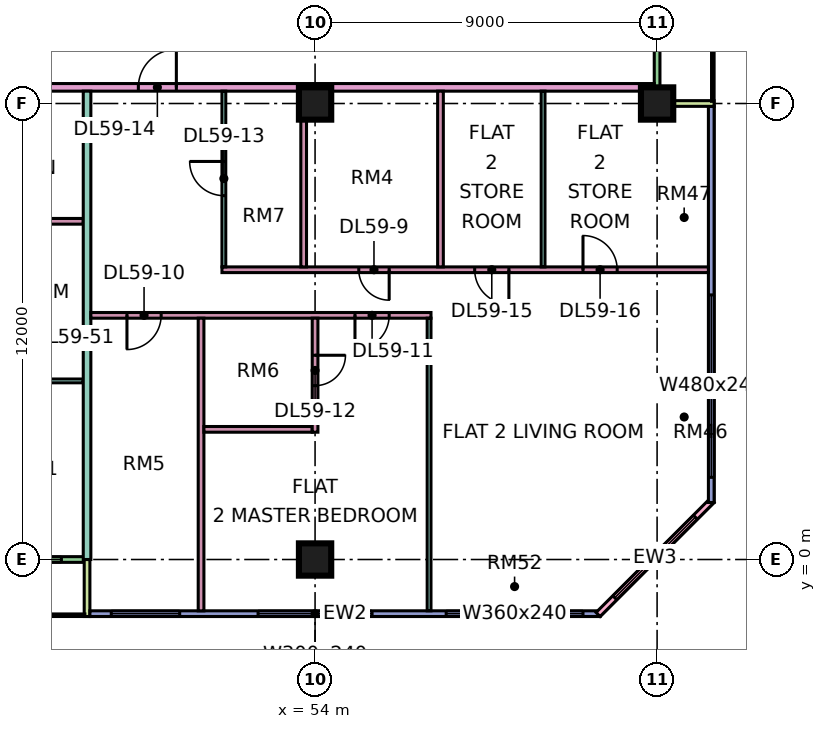
"""IFC4 building model, lengths in metres.
Left out: names, types, materials, properties, quantities, classifications, styles, units other than length and angle.
Written with IfcOpenShell. Run it as: python <this file> out.ifc"""

import sys

from ifc_helpers import new_model, si_unit, direction, frame, frame_2d, origin, origin_2d, place, context, subcontext, project, spatial, rectangle, extrude, element, fill, save


model = new_model("IFC4")
c1 = context("Model", 3, precision=1e-05, world=origin(), true_north=direction((0.0, 1.0)))
c2 = subcontext(c1, "Body", "Model", "MODEL_VIEW")
j1 = project(units=[si_unit("LENGTHUNIT", "METRE"), si_unit("PLANEANGLEUNIT", "RADIAN")], contexts=[c1])
p1 = place(None, origin())
s1 = spatial("IfcSite", under=j1, at=p1, CompositionType="ELEMENT")
p2 = place(p1, origin())
s2 = spatial("IfcBuilding", under=s1, at=p2, CompositionType="ELEMENT")
p3 = place(p2, frame((0.0, 0.0, 249.15)))
s3 = spatial("IfcBuildingStorey", under=s2, at=p3, CompositionType="ELEMENT", Elevation=249.15)
for number, where, z_axis, x_axis in (
    (1, (54.0, 0.0, 0.0), (0.0, 0.0, 1.0), (1.0, 0.0, 0.0)),
    (2, (54.0, 12.0, 0.0), (0.0, 0.0, 1.0), (1.0, 0.0, 0.0)),
    (3, (63.0, 12.0, 0.0), (0.0, 0.0, 1.0), (1.0, 0.0, 0.0)),
):
    element("IfcColumn", number, at=place(p3, frame(where, z_axis=z_axis, x_axis=x_axis)), inside=s3, PredefinedType="COLUMN", context=c2, shape_type="SweptSolid", body=[
        extrude(rectangle(XDim=0.85, YDim=0.85, at=origin_2d()), origin(), (0.0, 0.0, 1.0), 3.75),
    ])
p4 = place(p3, frame((36.075, 0.0, 0.0), z_axis=(0.0, 0.0, 1.0), x_axis=(1.0, 0.0, 0.0)))
e4 = element("IfcWall", 4, at=p4, inside=s3, PredefinedType="SOLIDWALL", context=c2, shape_type="SweptSolid", body=[
    extrude(rectangle(XDim=11.85, YDim=0.15, at=frame_2d((5.925, 0.0))), origin(), (0.0, 0.0, 1.0), 3.35),
])
p5 = place(p4, frame((2.288, 0.0, 0.0)))
e5 = element("IfcOpeningElement", 5, at=p5, cuts=e4, PredefinedType="OPENING", context=c2, shape_type="SweptSolid", body=[
    extrude(rectangle(XDim=1.8, YDim=2.4, at=frame_2d((0.9, 1.2))), frame((0.0, 0.085, 0.0), z_axis=(0.0, -1.0, 0.0), x_axis=(1.0, 0.0, 0.0)), (0.0, 0.0, 1.0), 0.17),
])
p6 = place(p4, frame((6.562, 0.0, 0.45)))
e6 = element("IfcOpeningElement", 6, at=p6, cuts=e4, PredefinedType="OPENING", context=c2, shape_type="SweptSolid", body=[
    extrude(rectangle(XDim=1.2, YDim=2.4, at=frame_2d((0.6, 1.2))), frame((0.0, 0.085, 0.0), z_axis=(0.0, -1.0, 0.0), x_axis=(1.0, 0.0, 0.0)), (0.0, 0.0, 1.0), 0.17),
])
p7 = place(p4, frame((10.05, 0.0, 0.45)))
e7 = element("IfcOpeningElement", 7, at=p7, cuts=e4, PredefinedType="OPENING", context=c2, shape_type="SweptSolid", body=[
    extrude(rectangle(XDim=1.2, YDim=2.4, at=frame_2d((0.6, 1.2))), frame((0.0, 0.085, 0.0), z_axis=(0.0, -1.0, 0.0), x_axis=(1.0, 0.0, 0.0)), (0.0, 0.0, 1.0), 0.17),
])
p8 = place(p3, frame((48.0, -1.5, 0.0), z_axis=(0.0, 0.0, 1.0), x_axis=(0.0, 1.0, 0.0)))
e8 = element("IfcWall", 8, at=p8, inside=s3, PredefinedType="SOLIDWALL", context=c2, shape_type="SweptSolid", body=[
    extrude(rectangle(XDim=1.5, YDim=0.15, at=frame_2d((0.75, 0.0))), origin(), (0.0, 0.0, 1.0), 3.35),
])
p9 = place(p3, frame((48.075, -1.425, 0.0), z_axis=(0.0, 0.0, 1.0), x_axis=(1.0, 0.0, 0.0)))
e9 = element("IfcWall", 9, at=p9, inside=s3, PredefinedType="SOLIDWALL", context=c2, shape_type="SweptSolid", body=[
    extrude(rectangle(XDim=13.425, YDim=0.15, at=frame_2d((6.712, 0.0))), origin(), (0.0, 0.0, 1.0), 3.35),
])
p10 = place(p9, frame((0.562, 0.0, 0.45)))
e10 = element("IfcOpeningElement", 10, at=p10, cuts=e9, PredefinedType="OPENING", context=c2, shape_type="SweptSolid", body=[
    extrude(rectangle(XDim=1.8, YDim=2.4, at=frame_2d((0.9, 1.2))), frame((0.0, 0.085, 0.0), z_axis=(0.0, -1.0, 0.0), x_axis=(1.0, 0.0, 0.0)), (0.0, 0.0, 1.0), 0.17),
])
p11 = place(p9, frame((4.425, 0.0, 0.45)))
e11 = element("IfcOpeningElement", 11, at=p11, cuts=e9, PredefinedType="OPENING", context=c2, shape_type="SweptSolid", body=[
    extrude(rectangle(XDim=3.0, YDim=2.4, at=frame_2d((1.5, 1.2))), frame((0.0, 0.085, 0.0), z_axis=(0.0, -1.0, 0.0), x_axis=(1.0, 0.0, 0.0)), (0.0, 0.0, 1.0), 0.17),
])
p12 = place(p9, frame((9.375, 0.0, 0.45)))
e12 = element("IfcOpeningElement", 12, at=p12, cuts=e9, PredefinedType="OPENING", context=c2, shape_type="SweptSolid", body=[
    extrude(rectangle(XDim=3.6, YDim=2.4, at=frame_2d((1.8, 1.2))), frame((0.0, 0.085, 0.0), z_axis=(0.0, -1.0, 0.0), x_axis=(1.0, 0.0, 0.0)), (0.0, 0.0, 1.0), 0.17),
])
p13 = place(p3, frame((61.447, -1.447, 0.0), z_axis=(0.0, 0.0, 1.0), x_axis=(0.707106781187, 0.707106781187, 0.0)))
e13 = element("IfcWall", 13, at=p13, inside=s3, PredefinedType="SOLIDWALL", context=c2, shape_type="SweptSolid", body=[
    extrude(rectangle(XDim=4.243, YDim=0.15, at=frame_2d((2.121, 0.0))), origin(), (0.0, 0.0, 1.0), 3.35),
])
p14 = place(p13, frame((0.621, 0.0, 0.45)))
e14 = element("IfcOpeningElement", 14, at=p14, cuts=e13, PredefinedType="OPENING", context=c2, shape_type="SweptSolid", body=[
    extrude(rectangle(XDim=3.0, YDim=2.4, at=frame_2d((1.5, 1.2))), frame((0.0, 0.085, 0.0), z_axis=(0.0, -1.0, 0.0), x_axis=(1.0, 0.0, 0.0)), (0.0, 0.0, 1.0), 0.17),
])
p15 = place(p3, frame((64.425, 1.5, 0.0), z_axis=(0.0, 0.0, 1.0), x_axis=(0.0, 1.0, 0.0)))
e15 = element("IfcWall", 15, at=p15, inside=s3, PredefinedType="SOLIDWALL", context=c2, shape_type="SweptSolid", body=[
    extrude(rectangle(XDim=10.425, YDim=0.15, at=frame_2d((5.212, 0.0))), origin(), (0.0, 0.0, 1.0), 3.35),
])
p16 = place(p15, frame((0.663, 0.0, 0.45)))
e16 = element("IfcOpeningElement", 16, at=p16, cuts=e15, PredefinedType="OPENING", context=c2, shape_type="SweptSolid", body=[
    extrude(rectangle(XDim=4.8, YDim=2.4, at=frame_2d((2.4, 1.2))), frame((0.0, 0.085, 0.0), z_axis=(0.0, -1.0, 0.0), x_axis=(1.0, 0.0, 0.0)), (0.0, 0.0, 1.0), 0.17),
])
p17 = place(p3, frame((63.0, 12.075, 0.0), z_axis=(0.0, 0.0, 1.0), x_axis=(0.0, 1.0, 0.0)))
e17 = element("IfcWall", 17, at=p17, inside=s3, PredefinedType="SOLIDWALL", context=c2, shape_type="SweptSolid", body=[
    extrude(rectangle(XDim=10.35, YDim=0.15, at=frame_2d((5.175, 0.0))), origin(), (0.0, 0.0, 1.0), 3.35),
])
p18 = place(p17, frame((4.875, 0.0, 0.0)))
e18 = element("IfcOpeningElement", 18, at=p18, cuts=e17, PredefinedType="OPENING", context=c2, shape_type="SweptSolid", body=[
    extrude(rectangle(XDim=1.8, YDim=2.4, at=frame_2d((0.9, 1.2))), frame((0.0, 0.085, 0.0), z_axis=(0.0, -1.0, 0.0), x_axis=(1.0, 0.0, 0.0)), (0.0, 0.0, 1.0), 0.17),
])
p19 = place(p17, frame((8.587, 0.0, 0.45)))
e19 = element("IfcOpeningElement", 19, at=p19, cuts=e17, PredefinedType="OPENING", context=c2, shape_type="SweptSolid", body=[
    extrude(rectangle(XDim=1.2, YDim=2.4, at=frame_2d((0.6, 1.2))), frame((0.0, 0.085, 0.0), z_axis=(0.0, -1.0, 0.0), x_axis=(1.0, 0.0, 0.0)), (0.0, 0.0, 1.0), 0.17),
])
p20 = place(p3, frame((64.5, 12.0, 0.0), z_axis=(0.0, 0.0, 1.0), x_axis=(-1.0, 0.0, 0.0)))
e20 = element("IfcWall", 20, at=p20, inside=s3, PredefinedType="SOLIDWALL", context=c2, shape_type="SweptSolid", body=[
    extrude(rectangle(XDim=1.5, YDim=0.15, at=frame_2d((0.75, 0.0))), origin(), (0.0, 0.0, 1.0), 3.35),
])
p21 = place(p3, frame((33.05, 4.7, 0.0), z_axis=(0.0, 0.0, 1.0), x_axis=(1.0, 0.0, 0.0)))
e21 = element("IfcWall", 21, at=p21, inside=s3, PredefinedType="PARTITIONING", context=c2, shape_type="SweptSolid", body=[
    extrude(rectangle(XDim=14.85, YDim=0.1, at=frame_2d((7.425, 0.0))), origin(), (0.0, 0.0, 1.0), 3.35),
])
p22 = place(p21, frame((10.0, 0.0, 0.0)))
e22 = element("IfcOpeningElement", 22, at=p22, cuts=e21, PredefinedType="OPENING", context=c2, shape_type="SweptSolid", body=[
    extrude(rectangle(XDim=0.9, YDim=2.1, at=frame_2d((0.45, 1.05))), frame((0.0, 0.06, 0.0), z_axis=(0.0, -1.0, 0.0), x_axis=(1.0, 0.0, 0.0)), (0.0, 0.0, 1.0), 0.12),
])
p23 = place(p21, frame((13.0, 0.0, 0.0)))
e23 = element("IfcOpeningElement", 23, at=p23, cuts=e21, PredefinedType="OPENING", context=c2, shape_type="SweptSolid", body=[
    extrude(rectangle(XDim=0.9, YDim=2.1, at=frame_2d((0.45, 1.05))), frame((0.0, 0.06, 0.0), z_axis=(0.0, -1.0, 0.0), x_axis=(1.0, 0.0, 0.0)), (0.0, 0.0, 1.0), 0.12),
])
p24 = place(p21, frame((4.0, 0.0, 0.0)))
e24 = element("IfcOpeningElement", 24, at=p24, cuts=e21, PredefinedType="OPENING", context=c2, shape_type="SweptSolid", body=[
    extrude(rectangle(XDim=0.9, YDim=2.1, at=frame_2d((0.45, 1.05))), frame((0.0, 0.06, 0.0), z_axis=(0.0, -1.0, 0.0), x_axis=(1.0, 0.0, 0.0)), (0.0, 0.0, 1.0), 0.12),
])
p25 = place(p3, frame((40.65, 12.425, 0.0), z_axis=(0.0, 0.0, 1.0), x_axis=(1.0, 0.0, 0.0)))
e25 = element("IfcWall", 25, at=p25, inside=s3, PredefinedType="PARTITIONING", context=c2, shape_type="SweptSolid", body=[
    extrude(rectangle(XDim=22.276, YDim=0.2, at=frame_2d((11.138, 0.0))), origin(), (0.0, 0.0, 1.0), 3.35),
])
p26 = place(p25, frame((8.7, 0.0, 0.0)))
e26 = element("IfcOpeningElement", 26, at=p26, cuts=e25, PredefinedType="OPENING", context=c2, shape_type="SweptSolid", body=[
    extrude(rectangle(XDim=1.0, YDim=2.1, at=frame_2d((0.5, 1.05))), frame((0.0, 0.11, 0.0), z_axis=(0.0, -1.0, 0.0), x_axis=(1.0, 0.0, 0.0)), (0.0, 0.0, 1.0), 0.22),
])
p27 = place(p25, frame((1.05, 0.0, 0.0)))
e27 = element("IfcOpeningElement", 27, at=p27, cuts=e25, PredefinedType="OPENING", context=c2, shape_type="SweptSolid", body=[
    extrude(rectangle(XDim=1.0, YDim=2.1, at=frame_2d((0.5, 1.05))), frame((0.0, 0.11, 0.0), z_axis=(0.0, -1.0, 0.0), x_axis=(1.0, 0.0, 0.0)), (0.0, 0.0, 1.0), 0.22),
])
p28 = place(p3, frame((43.725, 5.9, 0.0), z_axis=(0.0, 0.0, 1.0), x_axis=(1.0, 0.0, 0.0)))
e28 = element("IfcWall", 28, at=p28, inside=s3, PredefinedType="PARTITIONING", context=c2, shape_type="SweptSolid", body=[
    extrude(rectangle(XDim=4.175, YDim=0.15, at=frame_2d((2.087, 0.0))), origin(), (0.0, 0.0, 1.0), 3.35),
])
p29 = place(p28, frame((1.675, 0.0, 0.0)))
e29 = element("IfcOpeningElement", 29, at=p29, cuts=e28, PredefinedType="OPENING", context=c2, shape_type="SweptSolid", body=[
    extrude(rectangle(XDim=0.8, YDim=2.1, at=frame_2d((0.4, 1.05))), frame((0.0, 0.085, 0.0), z_axis=(0.0, -1.0, 0.0), x_axis=(1.0, 0.0, 0.0)), (0.0, 0.0, 1.0), 0.17),
])
p30 = place(p3, frame((43.725, 8.9, 0.0), z_axis=(0.0, 0.0, 1.0), x_axis=(1.0, 0.0, 0.0)))
e30 = element("IfcWall", 30, at=p30, inside=s3, PredefinedType="PARTITIONING", context=c2, shape_type="SweptSolid", body=[
    extrude(rectangle(XDim=4.175, YDim=0.15, at=frame_2d((2.087, 0.0))), origin(), (0.0, 0.0, 1.0), 3.35),
])
p31 = place(p3, frame((48.0, 0.0, 0.0), z_axis=(0.0, 0.0, 1.0), x_axis=(0.0, 1.0, 0.0)))
e31 = element("IfcWall", 31, at=p31, inside=s3, PredefinedType="PARTITIONING", context=c2, shape_type="SweptSolid", body=[
    extrude(rectangle(XDim=12.325, YDim=0.2, at=frame_2d((6.163, 0.0))), origin(), (0.0, 0.0, 1.0), 3.35),
])
p32 = place(p3, frame((48.1, 6.425, 0.0), z_axis=(0.0, 0.0, 1.0), x_axis=(1.0, 0.0, 0.0)))
e32 = element("IfcWall", 32, at=p32, inside=s3, PredefinedType="PARTITIONING", context=c2, shape_type="SweptSolid", body=[
    extrude(rectangle(XDim=8.95, YDim=0.15, at=frame_2d((4.475, 0.0))), origin(), (0.0, 0.0, 1.0), 3.35),
])
p33 = place(p32, frame((0.95, 0.0, 0.0)))
e33 = element("IfcOpeningElement", 33, at=p33, cuts=e32, PredefinedType="OPENING", context=c2, shape_type="SweptSolid", body=[
    extrude(rectangle(XDim=0.9, YDim=2.1, at=frame_2d((0.45, 1.05))), frame((0.0, 0.085, 0.0), z_axis=(0.0, -1.0, 0.0), x_axis=(1.0, 0.0, 0.0)), (0.0, 0.0, 1.0), 0.17),
])
p34 = place(p32, frame((6.95, 0.0, 0.0)))
e34 = element("IfcOpeningElement", 34, at=p34, cuts=e32, PredefinedType="OPENING", context=c2, shape_type="SweptSolid", body=[
    extrude(rectangle(XDim=0.9, YDim=2.1, at=frame_2d((0.45, 1.05))), frame((0.0, 0.085, 0.0), z_axis=(0.0, -1.0, 0.0), x_axis=(1.0, 0.0, 0.0)), (0.0, 0.0, 1.0), 0.17),
])
p35 = place(p3, frame((51.0, -1.351, 0.0), z_axis=(0.0, 0.0, 1.0), x_axis=(0.0, 1.0, 0.0)))
e35 = element("IfcWall", 35, at=p35, inside=s3, PredefinedType="PARTITIONING", context=c2, shape_type="SweptSolid", body=[
    extrude(rectangle(XDim=7.701, YDim=0.15, at=frame_2d((3.851, 0.0))), origin(), (0.0, 0.0, 1.0), 3.35),
])
p36 = place(p3, frame((51.075, 3.425, 0.0), z_axis=(0.0, 0.0, 1.0), x_axis=(1.0, 0.0, 0.0)))
e36 = element("IfcWall", 36, at=p36, inside=s3, PredefinedType="PARTITIONING", context=c2, shape_type="SweptSolid", body=[
    extrude(rectangle(XDim=2.85, YDim=0.15, at=frame_2d((1.425, 0.0))), origin(), (0.0, 0.0, 1.0), 3.35),
])
p37 = place(p3, frame((51.55, 7.625, 0.0), z_axis=(0.0, 0.0, 1.0), x_axis=(1.0, 0.0, 0.0)))
e37 = element("IfcWall", 37, at=p37, inside=s3, PredefinedType="PARTITIONING", context=c2, shape_type="SweptSolid", body=[
    extrude(rectangle(XDim=12.8, YDim=0.15, at=frame_2d((6.4, 0.0))), origin(), (0.0, 0.0, 1.0), 3.35),
])
p38 = place(p37, frame((3.6, 0.0, 0.0)))
e38 = element("IfcOpeningElement", 38, at=p38, cuts=e37, PredefinedType="OPENING", context=c2, shape_type="SweptSolid", body=[
    extrude(rectangle(XDim=0.8, YDim=2.1, at=frame_2d((0.4, 1.05))), frame((0.0, 0.085, 0.0), z_axis=(0.0, -1.0, 0.0), x_axis=(1.0, 0.0, 0.0)), (0.0, 0.0, 1.0), 0.17),
])
p39 = place(p37, frame((6.65, 0.0, 0.0)))
e39 = element("IfcOpeningElement", 39, at=p39, cuts=e37, PredefinedType="OPENING", context=c2, shape_type="SweptSolid", body=[
    extrude(rectangle(XDim=0.9, YDim=2.1, at=frame_2d((0.45, 1.05))), frame((0.0, 0.085, 0.0), z_axis=(0.0, -1.0, 0.0), x_axis=(1.0, 0.0, 0.0)), (0.0, 0.0, 1.0), 0.17),
])
p40 = place(p37, frame((9.5, 0.0, 0.0)))
e40 = element("IfcOpeningElement", 40, at=p40, cuts=e37, PredefinedType="OPENING", context=c2, shape_type="SweptSolid", body=[
    extrude(rectangle(XDim=0.9, YDim=2.1, at=frame_2d((0.45, 1.05))), frame((0.0, 0.085, 0.0), z_axis=(0.0, -1.0, 0.0), x_axis=(1.0, 0.0, 0.0)), (0.0, 0.0, 1.0), 0.17),
])
p41 = place(p3, frame((51.6, 7.7, 0.0), z_axis=(0.0, 0.0, 1.0), x_axis=(0.0, 1.0, 0.0)))
e41 = element("IfcWall", 41, at=p41, inside=s3, PredefinedType="PARTITIONING", context=c2, shape_type="SweptSolid", body=[
    extrude(rectangle(XDim=4.625, YDim=0.1, at=frame_2d((2.312, 0.0))), origin(), (0.0, 0.0, 1.0), 3.35),
])
p42 = place(p41, frame((1.875, 0.0, 0.0)))
e42 = element("IfcOpeningElement", 42, at=p42, cuts=e41, PredefinedType="OPENING", context=c2, shape_type="SweptSolid", body=[
    extrude(rectangle(XDim=0.9, YDim=2.1, at=frame_2d((0.45, 1.05))), frame((0.0, 0.06, 0.0), z_axis=(0.0, -1.0, 0.0), x_axis=(1.0, 0.0, 0.0)), (0.0, 0.0, 1.0), 0.12),
])
p43 = place(p3, frame((53.7, 7.7, 0.0), z_axis=(0.0, 0.0, 1.0), x_axis=(0.0, 1.0, 0.0)))
e43 = element("IfcWall", 43, at=p43, inside=s3, PredefinedType="PARTITIONING", context=c2, shape_type="SweptSolid", body=[
    extrude(rectangle(XDim=4.625, YDim=0.15, at=frame_2d((2.312, 0.0))), origin(), (0.0, 0.0, 1.0), 3.35),
])
p44 = place(p3, frame((54.0, 3.35, 0.0), z_axis=(0.0, 0.0, 1.0), x_axis=(0.0, 1.0, 0.0)))
e44 = element("IfcWall", 44, at=p44, inside=s3, PredefinedType="PARTITIONING", context=c2, shape_type="SweptSolid", body=[
    extrude(rectangle(XDim=3.0, YDim=0.15, at=frame_2d((1.5, 0.0))), origin(), (0.0, 0.0, 1.0), 3.35),
])
p45 = place(p44, frame((1.225, 0.0, 0.0)))
e45 = element("IfcOpeningElement", 45, at=p45, cuts=e44, PredefinedType="OPENING", context=c2, shape_type="SweptSolid", body=[
    extrude(rectangle(XDim=0.8, YDim=2.1, at=frame_2d((0.4, 1.05))), frame((0.0, 0.085, 0.0), z_axis=(0.0, -1.0, 0.0), x_axis=(1.0, 0.0, 0.0)), (0.0, 0.0, 1.0), 0.17),
])
p46 = place(p3, frame((57.0, -1.35, 0.0), z_axis=(0.0, 0.0, 1.0), x_axis=(0.0, 1.0, 0.0)))
e46 = element("IfcWall", 46, at=p46, inside=s3, PredefinedType="PARTITIONING", context=c2, shape_type="SweptSolid", body=[
    extrude(rectangle(XDim=7.7, YDim=0.1, at=frame_2d((3.85, 0.0))), origin(), (0.0, 0.0, 1.0), 3.35),
])
p47 = place(p3, frame((57.3, 7.7, 0.0), z_axis=(0.0, 0.0, 1.0), x_axis=(0.0, 1.0, 0.0)))
e47 = element("IfcWall", 47, at=p47, inside=s3, PredefinedType="PARTITIONING", context=c2, shape_type="SweptSolid", body=[
    extrude(rectangle(XDim=4.625, YDim=0.15, at=frame_2d((2.312, 0.0))), origin(), (0.0, 0.0, 1.0), 3.35),
])
p48 = place(p3, frame((60.0, 7.7, 0.0), z_axis=(0.0, 0.0, 1.0), x_axis=(0.0, 1.0, 0.0)))
e48 = element("IfcWall", 48, at=p48, inside=s3, PredefinedType="PARTITIONING", context=c2, shape_type="SweptSolid", body=[
    extrude(rectangle(XDim=4.625, YDim=0.1, at=frame_2d((2.312, 0.0))), origin(), (0.0, 0.0, 1.0), 3.35),
])
p49 = place(p7, origin())
e49 = element("IfcWindow", 49, at=p49, inside=s3, PartitioningType="SINGLE_PANEL", PredefinedType="WINDOW", context=c2, shape_type="SweptSolid", body=[
    extrude(rectangle(XDim=1.2, YDim=2.4, at=frame_2d((0.6, 1.2))), frame((0.0, 0.03, 0.0), z_axis=(0.0, -1.0, 0.0), x_axis=(1.0, 0.0, 0.0)), (0.0, 0.0, 1.0), 0.06),
])
fill(e7, e49)
p50 = place(p10, origin())
e50 = element("IfcWindow", 50, at=p50, inside=s3, PartitioningType="SINGLE_PANEL", PredefinedType="WINDOW", context=c2, shape_type="SweptSolid", body=[
    extrude(rectangle(XDim=1.8, YDim=2.4, at=frame_2d((0.9, 1.2))), frame((0.0, 0.03, 0.0), z_axis=(0.0, -1.0, 0.0), x_axis=(1.0, 0.0, 0.0)), (0.0, 0.0, 1.0), 0.06),
])
fill(e10, e50)
p51 = place(p11, origin())
e51 = element("IfcWindow", 51, at=p51, inside=s3, PartitioningType="SINGLE_PANEL", PredefinedType="WINDOW", context=c2, shape_type="SweptSolid", body=[
    extrude(rectangle(XDim=3.0, YDim=2.4, at=frame_2d((1.5, 1.2))), frame((0.0, 0.03, 0.0), z_axis=(0.0, -1.0, 0.0), x_axis=(1.0, 0.0, 0.0)), (0.0, 0.0, 1.0), 0.06),
])
fill(e11, e51)
p52 = place(p12, origin())
e52 = element("IfcWindow", 52, at=p52, inside=s3, PartitioningType="SINGLE_PANEL", PredefinedType="WINDOW", context=c2, shape_type="SweptSolid", body=[
    extrude(rectangle(XDim=3.6, YDim=2.4, at=frame_2d((1.8, 1.2))), frame((0.0, 0.03, 0.0), z_axis=(0.0, -1.0, 0.0), x_axis=(1.0, 0.0, 0.0)), (0.0, 0.0, 1.0), 0.06),
])
fill(e12, e52)
p53 = place(p14, origin())
e53 = element("IfcWindow", 53, at=p53, inside=s3, PartitioningType="SINGLE_PANEL", PredefinedType="WINDOW", context=c2, shape_type="SweptSolid", body=[
    extrude(rectangle(XDim=3.0, YDim=2.4, at=frame_2d((1.5, 1.2))), frame((0.0, 0.03, 0.0), z_axis=(0.0, -1.0, 0.0), x_axis=(1.0, 0.0, 0.0)), (0.0, 0.0, 1.0), 0.06),
])
fill(e14, e53)
p54 = place(p16, origin())
e54 = element("IfcWindow", 54, at=p54, inside=s3, PartitioningType="SINGLE_PANEL", PredefinedType="WINDOW", context=c2, shape_type="SweptSolid", body=[
    extrude(rectangle(XDim=4.8, YDim=2.4, at=frame_2d((2.4, 1.2))), frame((0.0, 0.03, 0.0), z_axis=(0.0, -1.0, 0.0), x_axis=(1.0, 0.0, 0.0)), (0.0, 0.0, 1.0), 0.06),
])
fill(e16, e54)
p55 = place(p38, origin())
e55 = element("IfcDoor", 55, at=p55, inside=s3, OperationType="SINGLE_SWING_RIGHT", PredefinedType="DOOR", context=c2, shape_type="SweptSolid", body=[
    extrude(rectangle(XDim=0.8, YDim=2.1, at=frame_2d((0.4, 1.05))), frame((0.0, 0.025, 0.0), z_axis=(0.0, -1.0, 0.0), x_axis=(1.0, 0.0, 0.0)), (0.0, 0.0, 1.0), 0.05),
])
fill(e38, e55)
p56 = place(p33, frame((0.9, 0.0, 0.0), z_axis=(0.0, 0.0, 1.0), x_axis=(-1.0, 0.0, 0.0)))
e56 = element("IfcDoor", 56, at=p56, inside=s3, OperationType="SINGLE_SWING_LEFT", PredefinedType="DOOR", context=c2, shape_type="SweptSolid", body=[
    extrude(rectangle(XDim=0.9, YDim=2.1, at=frame_2d((0.45, 1.05))), frame((0.0, 0.025, 0.0), z_axis=(0.0, -1.0, 0.0), x_axis=(1.0, 0.0, 0.0)), (0.0, 0.0, 1.0), 0.05),
])
fill(e33, e56)
p57 = place(p34, frame((0.9, 0.0, 0.0), z_axis=(0.0, 0.0, 1.0), x_axis=(-1.0, 0.0, 0.0)))
e57 = element("IfcDoor", 57, at=p57, inside=s3, OperationType="SINGLE_SWING_LEFT", PredefinedType="DOOR", context=c2, shape_type="SweptSolid", body=[
    extrude(rectangle(XDim=0.9, YDim=2.1, at=frame_2d((0.45, 1.05))), frame((0.0, 0.025, 0.0), z_axis=(0.0, -1.0, 0.0), x_axis=(1.0, 0.0, 0.0)), (0.0, 0.0, 1.0), 0.05),
])
fill(e34, e57)
p58 = place(p45, origin())
e58 = element("IfcDoor", 58, at=p58, inside=s3, OperationType="SINGLE_SWING_RIGHT", PredefinedType="DOOR", context=c2, shape_type="SweptSolid", body=[
    extrude(rectangle(XDim=0.8, YDim=2.1, at=frame_2d((0.4, 1.05))), frame((0.0, 0.025, 0.0), z_axis=(0.0, -1.0, 0.0), x_axis=(1.0, 0.0, 0.0)), (0.0, 0.0, 1.0), 0.05),
])
fill(e45, e58)
p59 = place(p42, frame((0.9, 0.0, 0.0), z_axis=(0.0, 0.0, 1.0), x_axis=(-1.0, 0.0, 0.0)))
e59 = element("IfcDoor", 59, at=p59, inside=s3, OperationType="SINGLE_SWING_RIGHT", PredefinedType="DOOR", context=c2, shape_type="SweptSolid", body=[
    extrude(rectangle(XDim=0.9, YDim=2.1, at=frame_2d((0.45, 1.05))), frame((0.0, 0.025, 0.0), z_axis=(0.0, -1.0, 0.0), x_axis=(1.0, 0.0, 0.0)), (0.0, 0.0, 1.0), 0.05),
])
fill(e42, e59)
p60 = place(p26, frame((1.0, 0.0, 0.0), z_axis=(0.0, 0.0, 1.0), x_axis=(-1.0, 0.0, 0.0)))
e60 = element("IfcDoor", 60, at=p60, inside=s3, OperationType="SINGLE_SWING_RIGHT", PredefinedType="DOOR", context=c2, shape_type="SweptSolid", body=[
    extrude(rectangle(XDim=1.0, YDim=2.1, at=frame_2d((0.5, 1.05))), frame((0.0, 0.025, 0.0), z_axis=(0.0, -1.0, 0.0), x_axis=(1.0, 0.0, 0.0)), (0.0, 0.0, 1.0), 0.05),
])
fill(e26, e60)
p61 = place(p39, origin())
e61 = element("IfcDoor", 61, at=p61, inside=s3, OperationType="SINGLE_SWING_RIGHT", PredefinedType="DOOR", context=c2, shape_type="SweptSolid", body=[
    extrude(rectangle(XDim=0.9, YDim=2.1, at=frame_2d((0.45, 1.05))), frame((0.0, 0.025, 0.0), z_axis=(0.0, -1.0, 0.0), x_axis=(1.0, 0.0, 0.0)), (0.0, 0.0, 1.0), 0.05),
])
fill(e39, e61)
p62 = place(p40, origin())
e62 = element("IfcDoor", 62, at=p62, inside=s3, OperationType="SINGLE_SWING_LEFT", PredefinedType="DOOR", context=c2, shape_type="SweptSolid", body=[
    extrude(rectangle(XDim=0.9, YDim=2.1, at=frame_2d((0.45, 1.05))), frame((0.0, 0.025, 0.0), z_axis=(0.0, -1.0, 0.0), x_axis=(1.0, 0.0, 0.0)), (0.0, 0.0, 1.0), 0.05),
])
fill(e40, e62)
save(model, sys.argv[1])
